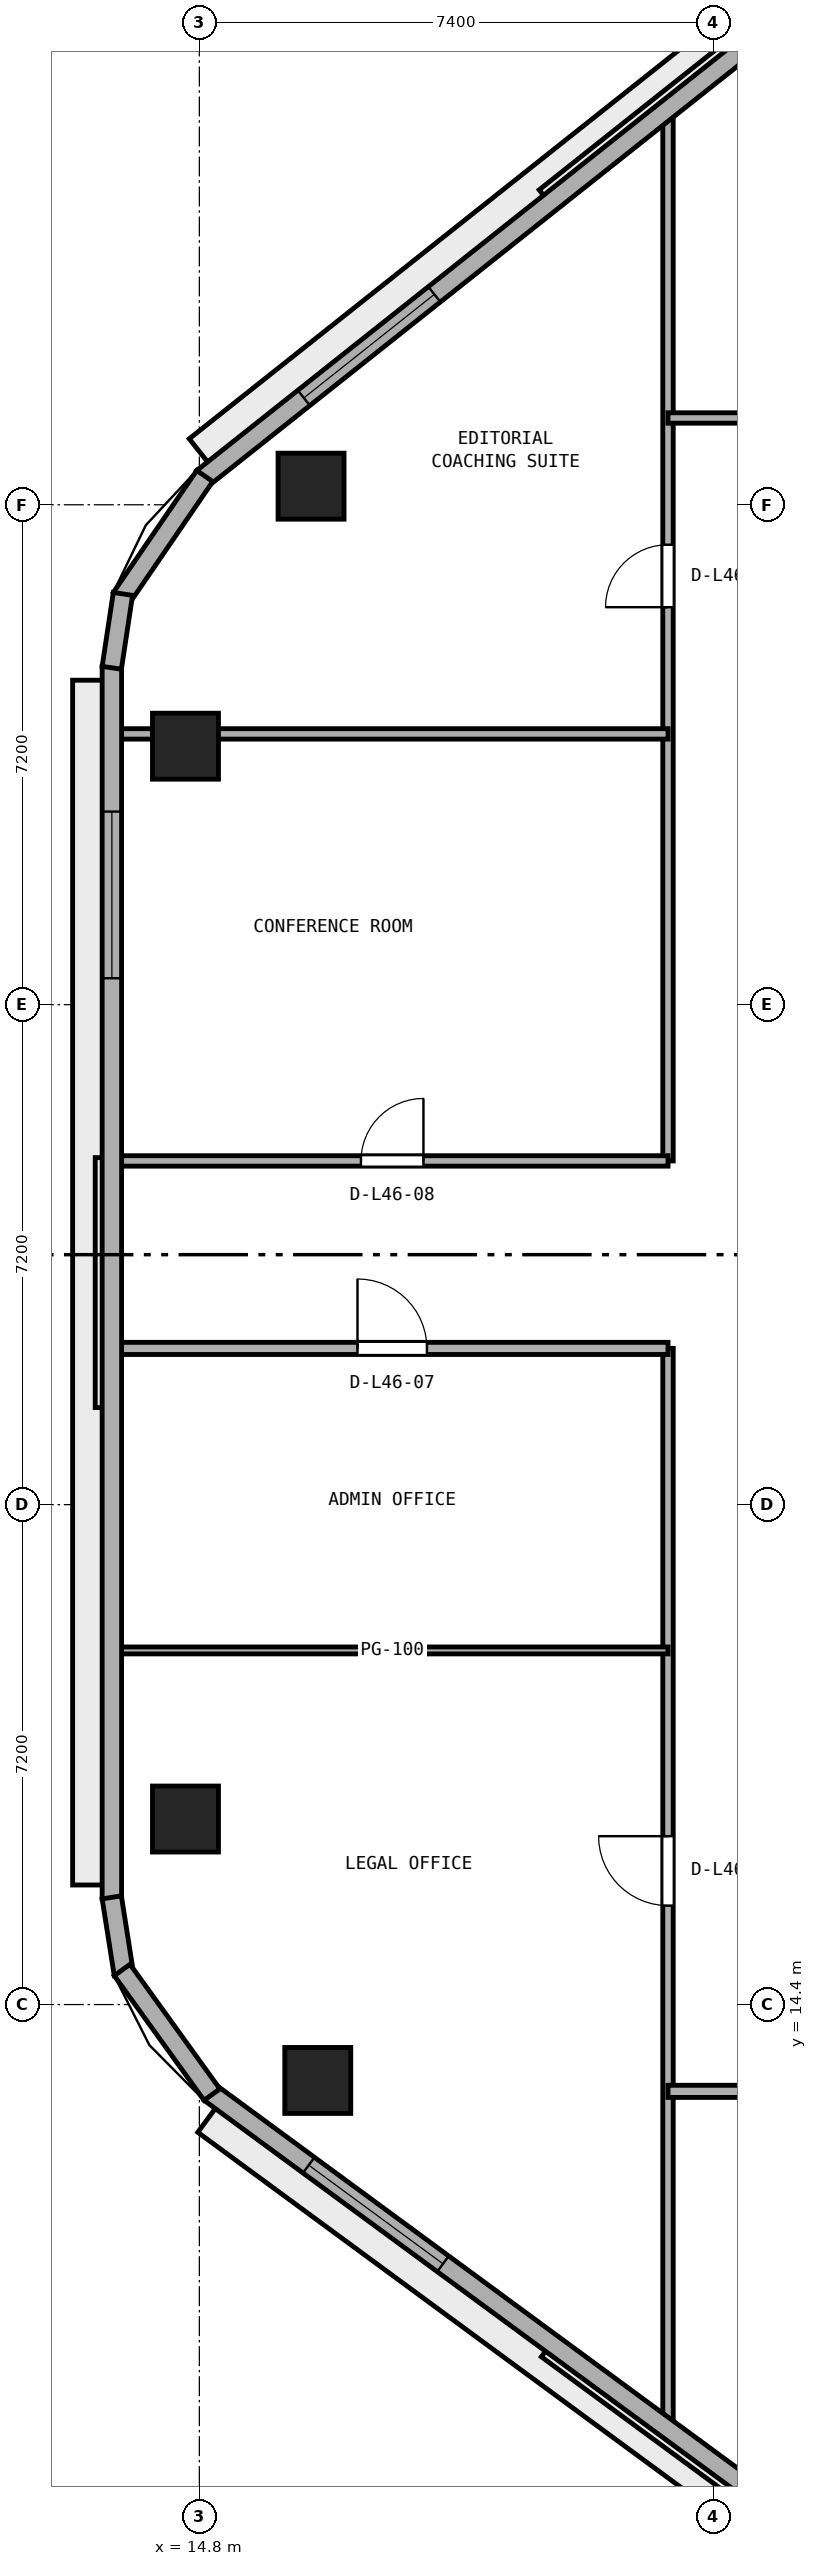
"""IFC4 building model, lengths in metres.
Left out: names, types, materials, properties, quantities, classifications, styles, units other than length and angle.
Written with IfcOpenShell. Run it as: python <this file> out.ifc"""

import sys

from ifc_helpers import new_model, si_unit, direction, frame, frame_2d, origin, origin_2d, place, context, subcontext, project, spatial, rectangle, extrude, element, fill, save


model = new_model("IFC4")
c1 = context("Model", 3, precision=1e-05, world=origin(), true_north=direction((0.0, 1.0)))
c2 = subcontext(c1, "Body", "Model", "MODEL_VIEW")
j1 = project(units=[si_unit("LENGTHUNIT", "METRE"), si_unit("PLANEANGLEUNIT", "RADIAN")], contexts=[c1])
p1 = place(None, origin())
s1 = spatial("IfcSite", under=j1, at=p1, CompositionType="ELEMENT")
p2 = place(p1, origin())
s2 = spatial("IfcBuilding", under=s1, at=p2, CompositionType="ELEMENT")
p3 = place(p2, frame((0.0, 0.0, 182.0)))
s3 = spatial("IfcBuildingStorey", under=s2, at=p3, CompositionType="ELEMENT", Elevation=182.0)
for number, where, z_axis, x_axis in (
    (1, (16.409, 36.268, 0.0), (0.0, 0.0, 1.0), (1.0, 0.0, 0.0)),
    (2, (14.6, 32.523, 0.0), (0.0, 0.0, 1.0), (1.0, 0.0, 0.0)),
    (3, (14.6, 17.072, 0.0), (0.0, 0.0, 1.0), (1.0, 0.0, 0.0)),
    (4, (16.505, 13.307, 0.0), (0.0, 0.0, 1.0), (1.0, 0.0, 0.0)),
):
    element("IfcColumn", number, at=place(p3, frame(where, z_axis=z_axis, x_axis=x_axis)), inside=s3, PredefinedType="COLUMN", context=c2, shape_type="SweptSolid", body=[
        extrude(rectangle(XDim=0.95, YDim=0.95, at=origin_2d()), origin(), (0.0, 0.0, 1.0), 3.8),
    ])
p4 = place(p3, frame((21.55, 8.25, 0.0), z_axis=(0.0, 0.0, 1.0), x_axis=(0.0, 1.0, 0.0)))
e5 = element("IfcWall", 5, at=p4, inside=s3, PredefinedType="PARTITIONING", context=c2, shape_type="SweptSolid", body=[
    extrude(rectangle(XDim=15.6, YDim=0.15, at=frame_2d((7.8, 0.0))), origin(), (0.0, 0.0, 1.0), 3.54),
])
p5 = place(p4, frame((7.574, 0.0, 0.0)))
e6 = element("IfcOpeningElement", 6, at=p5, cuts=e5, PredefinedType="OPENING", context=c2, shape_type="SweptSolid", body=[
    extrude(rectangle(XDim=1.0, YDim=2.12, at=frame_2d((0.5, 1.06))), frame((0.0, 0.085, 0.0), z_axis=(0.0, -1.0, 0.0), x_axis=(1.0, 0.0, 0.0)), (0.0, 0.0, 1.0), 0.17),
])
p6 = place(p3, frame((21.55, 26.55, 0.0), z_axis=(0.0, 0.0, 1.0), x_axis=(0.0, 1.0, 0.0)))
e7 = element("IfcWall", 7, at=p6, inside=s3, PredefinedType="PARTITIONING", context=c2, shape_type="SweptSolid", body=[
    extrude(rectangle(XDim=15.19, YDim=0.15, at=frame_2d((7.595, 0.0))), origin(), (0.0, 0.0, 1.0), 3.54),
])
p7 = place(p6, frame((7.975, 0.0, 0.0)))
e8 = element("IfcOpeningElement", 8, at=p7, cuts=e7, PredefinedType="OPENING", context=c2, shape_type="SweptSolid", body=[
    extrude(rectangle(XDim=0.9, YDim=2.1, at=frame_2d((0.45, 1.05))), frame((0.0, 0.085, 0.0), z_axis=(0.0, -1.0, 0.0), x_axis=(1.0, 0.0, 0.0)), (0.0, 0.0, 1.0), 0.17),
])
p8 = place(p3, frame((21.55, 13.15, 0.0), z_axis=(0.0, 0.0, 1.0), x_axis=(1.0, 0.0, 0.0)))
e9 = element("IfcWall", 9, at=p8, inside=s3, PredefinedType="PARTITIONING", context=c2, shape_type="SweptSolid", body=[
    extrude(rectangle(XDim=30.9, YDim=0.175, at=frame_2d((15.45, 0.0))), origin(), (0.0, 0.0, 1.0), 3.54),
])
p9 = place(p8, frame((4.145, 0.0, 0.0)))
e10 = element("IfcOpeningElement", 10, at=p9, cuts=e9, PredefinedType="OPENING", context=c2, shape_type="SweptSolid", body=[
    extrude(rectangle(XDim=1.0, YDim=2.12, at=frame_2d((0.5, 1.06))), frame((0.0, 0.097, 0.0), z_axis=(0.0, -1.0, 0.0), x_axis=(1.0, 0.0, 0.0)), (0.0, 0.0, 1.0), 0.195),
])
p10 = place(p8, frame((14.3, 0.0, 0.0)))
e11 = element("IfcOpeningElement", 11, at=p10, cuts=e9, PredefinedType="OPENING", context=c2, shape_type="SweptSolid", body=[
    extrude(rectangle(XDim=1.0, YDim=2.12, at=frame_2d((0.5, 1.06))), frame((0.0, 0.097, 0.0), z_axis=(0.0, -1.0, 0.0), x_axis=(1.0, 0.0, 0.0)), (0.0, 0.0, 1.0), 0.195),
])
p11 = place(p8, frame((25.105, 0.0, 0.0)))
e12 = element("IfcOpeningElement", 12, at=p11, cuts=e9, PredefinedType="OPENING", context=c2, shape_type="SweptSolid", body=[
    extrude(rectangle(XDim=1.0, YDim=2.12, at=frame_2d((0.5, 1.06))), frame((0.0, 0.097, 0.0), z_axis=(0.0, -1.0, 0.0), x_axis=(1.0, 0.0, 0.0)), (0.0, 0.0, 1.0), 0.195),
])
p12 = place(p3, frame((13.605, 19.5, 0.0), z_axis=(0.0, 0.0, 1.0), x_axis=(1.0, 0.0, 0.0)))
e13 = element("IfcWall", 13, at=p12, inside=s3, PredefinedType="PARTITIONING", context=c2, shape_type="SweptSolid", body=[
    extrude(rectangle(XDim=7.945, YDim=0.1, at=frame_2d((3.973, 0.0))), origin(), (0.0, 0.0, 1.0), 3.54),
])
p13 = place(p3, frame((13.605, 23.85, 0.0), z_axis=(0.0, 0.0, 1.0), x_axis=(1.0, 0.0, 0.0)))
e14 = element("IfcWall", 14, at=p13, inside=s3, PredefinedType="PARTITIONING", context=c2, shape_type="SweptSolid", body=[
    extrude(rectangle(XDim=7.945, YDim=0.175, at=frame_2d((3.973, 0.0))), origin(), (0.0, 0.0, 1.0), 3.54),
])
p14 = place(p13, frame((3.472, 0.0, 0.0)))
e15 = element("IfcOpeningElement", 15, at=p14, cuts=e14, PredefinedType="OPENING", context=c2, shape_type="SweptSolid", body=[
    extrude(rectangle(XDim=1.0, YDim=2.12, at=frame_2d((0.5, 1.06))), frame((0.0, 0.097, 0.0), z_axis=(0.0, -1.0, 0.0), x_axis=(1.0, 0.0, 0.0)), (0.0, 0.0, 1.0), 0.195),
])
p15 = place(p3, frame((13.605, 26.55, 0.0), z_axis=(0.0, 0.0, 1.0), x_axis=(1.0, 0.0, 0.0)))
e16 = element("IfcWall", 16, at=p15, inside=s3, PredefinedType="PARTITIONING", context=c2, shape_type="SweptSolid", body=[
    extrude(rectangle(XDim=7.945, YDim=0.15, at=frame_2d((3.973, 0.0))), origin(), (0.0, 0.0, 1.0), 3.54),
])
p16 = place(p15, frame((3.522, 0.0, 0.0)))
e17 = element("IfcOpeningElement", 17, at=p16, cuts=e16, PredefinedType="OPENING", context=c2, shape_type="SweptSolid", body=[
    extrude(rectangle(XDim=0.9, YDim=2.1, at=frame_2d((0.45, 1.05))), frame((0.0, 0.085, 0.0), z_axis=(0.0, -1.0, 0.0), x_axis=(1.0, 0.0, 0.0)), (0.0, 0.0, 1.0), 0.17),
])
p17 = place(p3, frame((13.605, 32.7, 0.0), z_axis=(0.0, 0.0, 1.0), x_axis=(1.0, 0.0, 0.0)))
e18 = element("IfcWall", 18, at=p17, inside=s3, PredefinedType="PARTITIONING", context=c2, shape_type="SweptSolid", body=[
    extrude(rectangle(XDim=7.945, YDim=0.15, at=frame_2d((3.973, 0.0))), origin(), (0.0, 0.0, 1.0), 2.923),
])
p18 = place(p3, frame((21.55, 37.25, 0.0), z_axis=(0.0, 0.0, 1.0), x_axis=(1.0, 0.0, 0.0)))
e19 = element("IfcWall", 19, at=p18, inside=s3, PredefinedType="PARTITIONING", context=c2, shape_type="SweptSolid", body=[
    extrude(rectangle(XDim=12.85, YDim=0.15, at=frame_2d((6.425, 0.0))), origin(), (0.0, 0.0, 1.0), 3.54),
])
p19 = place(p18, frame((4.795, 0.0, 0.0)))
e20 = element("IfcOpeningElement", 20, at=p19, cuts=e19, PredefinedType="OPENING", context=c2, shape_type="SweptSolid", body=[
    extrude(rectangle(XDim=1.0, YDim=2.12, at=frame_2d((0.5, 1.06))), frame((0.0, 0.085, 0.0), z_axis=(0.0, -1.0, 0.0), x_axis=(1.0, 0.0, 0.0)), (0.0, 0.0, 1.0), 0.17),
])
p20 = place(p3, frame((27.658, 46.55, 0.0), z_axis=(0.0, 0.0, 1.0), x_axis=(-0.783266285861, -0.621686356158, 0.0)))
e21 = element("IfcWall", 21, at=p20, inside=s3, PredefinedType="STANDARD", context=c2, shape_type="SweptSolid", body=[
    extrude(rectangle(XDim=16.353, YDim=0.28, at=frame_2d((8.177, 0.0))), origin(), (0.0, 0.0, 1.0), 3.54),
])
p21 = place(p20, frame((1.859, 0.0, 0.9)))
e22 = element("IfcOpeningElement", 22, at=p21, cuts=e21, PredefinedType="OPENING", context=c2, shape_type="SweptSolid", body=[
    extrude(rectangle(XDim=2.4, YDim=1.75, at=frame_2d((1.2, 0.875))), frame((0.0, 0.15, 0.0), z_axis=(0.0, -1.0, 0.0), x_axis=(1.0, 0.0, 0.0)), (0.0, 0.0, 1.0), 0.3),
])
p22 = place(p20, frame((12.094, 0.0, 0.9)))
e23 = element("IfcOpeningElement", 23, at=p22, cuts=e21, PredefinedType="OPENING", context=c2, shape_type="SweptSolid", body=[
    extrude(rectangle(XDim=2.4, YDim=1.75, at=frame_2d((1.2, 0.875))), frame((0.0, 0.15, 0.0), z_axis=(0.0, -1.0, 0.0), x_axis=(1.0, 0.0, 0.0)), (0.0, 0.0, 1.0), 0.3),
])
p23 = place(p3, frame((13.54, 33.673, 0.0), z_axis=(0.0, 0.0, 1.0), x_axis=(0.0, -1.0, 0.0)))
e24 = element("IfcWall", 24, at=p23, inside=s3, PredefinedType="STANDARD", context=c2, shape_type="SweptSolid", body=[
    extrude(rectangle(XDim=17.751, YDim=0.28, at=frame_2d((8.875, 0.0))), origin(), (0.0, 0.0, 1.0), 3.54),
])
p24 = place(p23, frame((2.092, 0.0, 0.9)))
e25 = element("IfcOpeningElement", 25, at=p24, cuts=e24, PredefinedType="OPENING", context=c2, shape_type="SweptSolid", body=[
    extrude(rectangle(XDim=2.4, YDim=1.75, at=frame_2d((1.2, 0.875))), frame((0.0, 0.15, 0.0), z_axis=(0.0, -1.0, 0.0), x_axis=(1.0, 0.0, 0.0)), (0.0, 0.0, 1.0), 0.3),
])
p25 = place(p3, frame((14.951, 13.134, 0.0), z_axis=(0.0, 0.0, 1.0), x_axis=(0.805804940328, -0.592181051827, 0.0)))
e26 = element("IfcWall", 26, at=p25, inside=s3, PredefinedType="STANDARD", context=c2, shape_type="SweptSolid", body=[
    extrude(rectangle(XDim=15.804, YDim=0.28, at=frame_2d((7.902, 0.0))), origin(), (0.0, 0.0, 1.0), 3.54),
])
p26 = place(p25, frame((1.767, 0.0, 0.9)))
e27 = element("IfcOpeningElement", 27, at=p26, cuts=e26, PredefinedType="OPENING", context=c2, shape_type="SweptSolid", body=[
    extrude(rectangle(XDim=2.4, YDim=1.75, at=frame_2d((1.2, 0.875))), frame((0.0, 0.15, 0.0), z_axis=(0.0, -1.0, 0.0), x_axis=(1.0, 0.0, 0.0)), (0.0, 0.0, 1.0), 0.3),
])
p27 = place(p25, frame((11.637, 0.0, 0.9)))
e28 = element("IfcOpeningElement", 28, at=p27, cuts=e26, PredefinedType="OPENING", context=c2, shape_type="SweptSolid", body=[
    extrude(rectangle(XDim=2.4, YDim=1.75, at=frame_2d((1.2, 0.875))), frame((0.0, 0.15, 0.0), z_axis=(0.0, -1.0, 0.0), x_axis=(1.0, 0.0, 0.0)), (0.0, 0.0, 1.0), 0.3),
])
p28 = place(p3, frame((14.878, 36.414, 0.0), z_axis=(0.0, 0.0, 1.0), x_axis=(-0.564564614133, -0.825388875906, 0.0)))
e29 = element("IfcWall", 29, at=p28, inside=s3, PredefinedType="STANDARD", context=c2, shape_type="SweptSolid", body=[
    extrude(rectangle(XDim=2.128, YDim=0.28, at=frame_2d((1.064, 0.0))), origin(), (0.0, 0.0, 1.0), 3.54),
])
p29 = place(p3, frame((13.699, 34.716, 0.0), z_axis=(0.0, 0.0, 1.0), x_axis=(-0.149549920187, -0.988754176412, 0.0)))
e30 = element("IfcWall", 30, at=p29, inside=s3, PredefinedType="STANDARD", context=c2, shape_type="SweptSolid", body=[
    extrude(rectangle(XDim=1.076, YDim=0.28, at=frame_2d((0.538, 0.0))), origin(), (0.0, 0.0, 1.0), 3.54),
])
p30 = place(p3, frame((13.538, 15.944, 0.0), z_axis=(0.0, 0.0, 1.0), x_axis=(0.155447556013, -0.987844146275, 0.0)))
e31 = element("IfcWall", 31, at=p30, inside=s3, PredefinedType="STANDARD", context=c2, shape_type="SweptSolid", body=[
    extrude(rectangle(XDim=1.12, YDim=0.28, at=frame_2d((0.56, 0.0))), origin(), (0.0, 0.0, 1.0), 3.54),
])
p31 = place(p3, frame((13.688, 14.898, 0.0), z_axis=(0.0, 0.0, 1.0), x_axis=(0.584833657716, -0.811153248655, 0.0)))
e32 = element("IfcWall", 32, at=p31, inside=s3, PredefinedType="STANDARD", context=c2, shape_type="SweptSolid", body=[
    extrude(rectangle(XDim=2.212, YDim=0.28, at=frame_2d((1.106, 0.0))), origin(), (0.0, 0.0, 1.0), 3.54),
])
p32 = place(p5, origin())
e33 = element("IfcDoor", 33, at=p32, inside=s3, OperationType="SINGLE_SWING_RIGHT", PredefinedType="DOOR", context=c2, shape_type="SweptSolid", body=[
    extrude(rectangle(XDim=1.0, YDim=2.12, at=frame_2d((0.5, 1.06))), frame((0.0, 0.025, 0.0), z_axis=(0.0, -1.0, 0.0), x_axis=(1.0, 0.0, 0.0)), (0.0, 0.0, 1.0), 0.05),
])
fill(e6, e33)
p33 = place(p14, origin())
e34 = element("IfcDoor", 34, at=p33, inside=s3, OperationType="SINGLE_SWING_LEFT", PredefinedType="DOOR", context=c2, shape_type="SweptSolid", body=[
    extrude(rectangle(XDim=1.0, YDim=2.12, at=frame_2d((0.5, 1.06))), frame((0.0, 0.025, 0.0), z_axis=(0.0, -1.0, 0.0), x_axis=(1.0, 0.0, 0.0)), (0.0, 0.0, 1.0), 0.05),
])
fill(e15, e34)
p34 = place(p16, origin())
e35 = element("IfcDoor", 35, at=p34, inside=s3, OperationType="SINGLE_SWING_RIGHT", PredefinedType="DOOR", context=c2, shape_type="SweptSolid", body=[
    extrude(rectangle(XDim=0.9, YDim=2.1, at=frame_2d((0.45, 1.05))), frame((0.0, 0.025, 0.0), z_axis=(0.0, -1.0, 0.0), x_axis=(1.0, 0.0, 0.0)), (0.0, 0.0, 1.0), 0.05),
])
fill(e17, e35)
p35 = place(p7, origin())
e36 = element("IfcDoor", 36, at=p35, inside=s3, OperationType="SINGLE_SWING_LEFT", PredefinedType="DOOR", context=c2, shape_type="SweptSolid", body=[
    extrude(rectangle(XDim=0.9, YDim=2.1, at=frame_2d((0.45, 1.05))), frame((0.0, 0.025, 0.0), z_axis=(0.0, -1.0, 0.0), x_axis=(1.0, 0.0, 0.0)), (0.0, 0.0, 1.0), 0.05),
])
fill(e8, e36)
p36 = place(p22, origin())
e37 = element("IfcWindow", 37, at=p36, inside=s3, PartitioningType="SINGLE_PANEL", PredefinedType="WINDOW", context=c2, shape_type="SweptSolid", body=[
    extrude(rectangle(XDim=2.4, YDim=1.75, at=frame_2d((1.2, 0.875))), frame((0.0, 0.03, 0.0), z_axis=(0.0, -1.0, 0.0), x_axis=(1.0, 0.0, 0.0)), (0.0, 0.0, 1.0), 0.06),
])
fill(e23, e37)
p37 = place(p24, origin())
e38 = element("IfcWindow", 38, at=p37, inside=s3, PartitioningType="SINGLE_PANEL", PredefinedType="WINDOW", context=c2, shape_type="SweptSolid", body=[
    extrude(rectangle(XDim=2.4, YDim=1.75, at=frame_2d((1.2, 0.875))), frame((0.0, 0.03, 0.0), z_axis=(0.0, -1.0, 0.0), x_axis=(1.0, 0.0, 0.0)), (0.0, 0.0, 1.0), 0.06),
])
fill(e25, e38)
p38 = place(p26, origin())
e39 = element("IfcWindow", 39, at=p38, inside=s3, PartitioningType="SINGLE_PANEL", PredefinedType="WINDOW", context=c2, shape_type="SweptSolid", body=[
    extrude(rectangle(XDim=2.4, YDim=1.75, at=frame_2d((1.2, 0.875))), frame((0.0, 0.03, 0.0), z_axis=(0.0, -1.0, 0.0), x_axis=(1.0, 0.0, 0.0)), (0.0, 0.0, 1.0), 0.06),
])
fill(e27, e39)
save(model, sys.argv[1])
